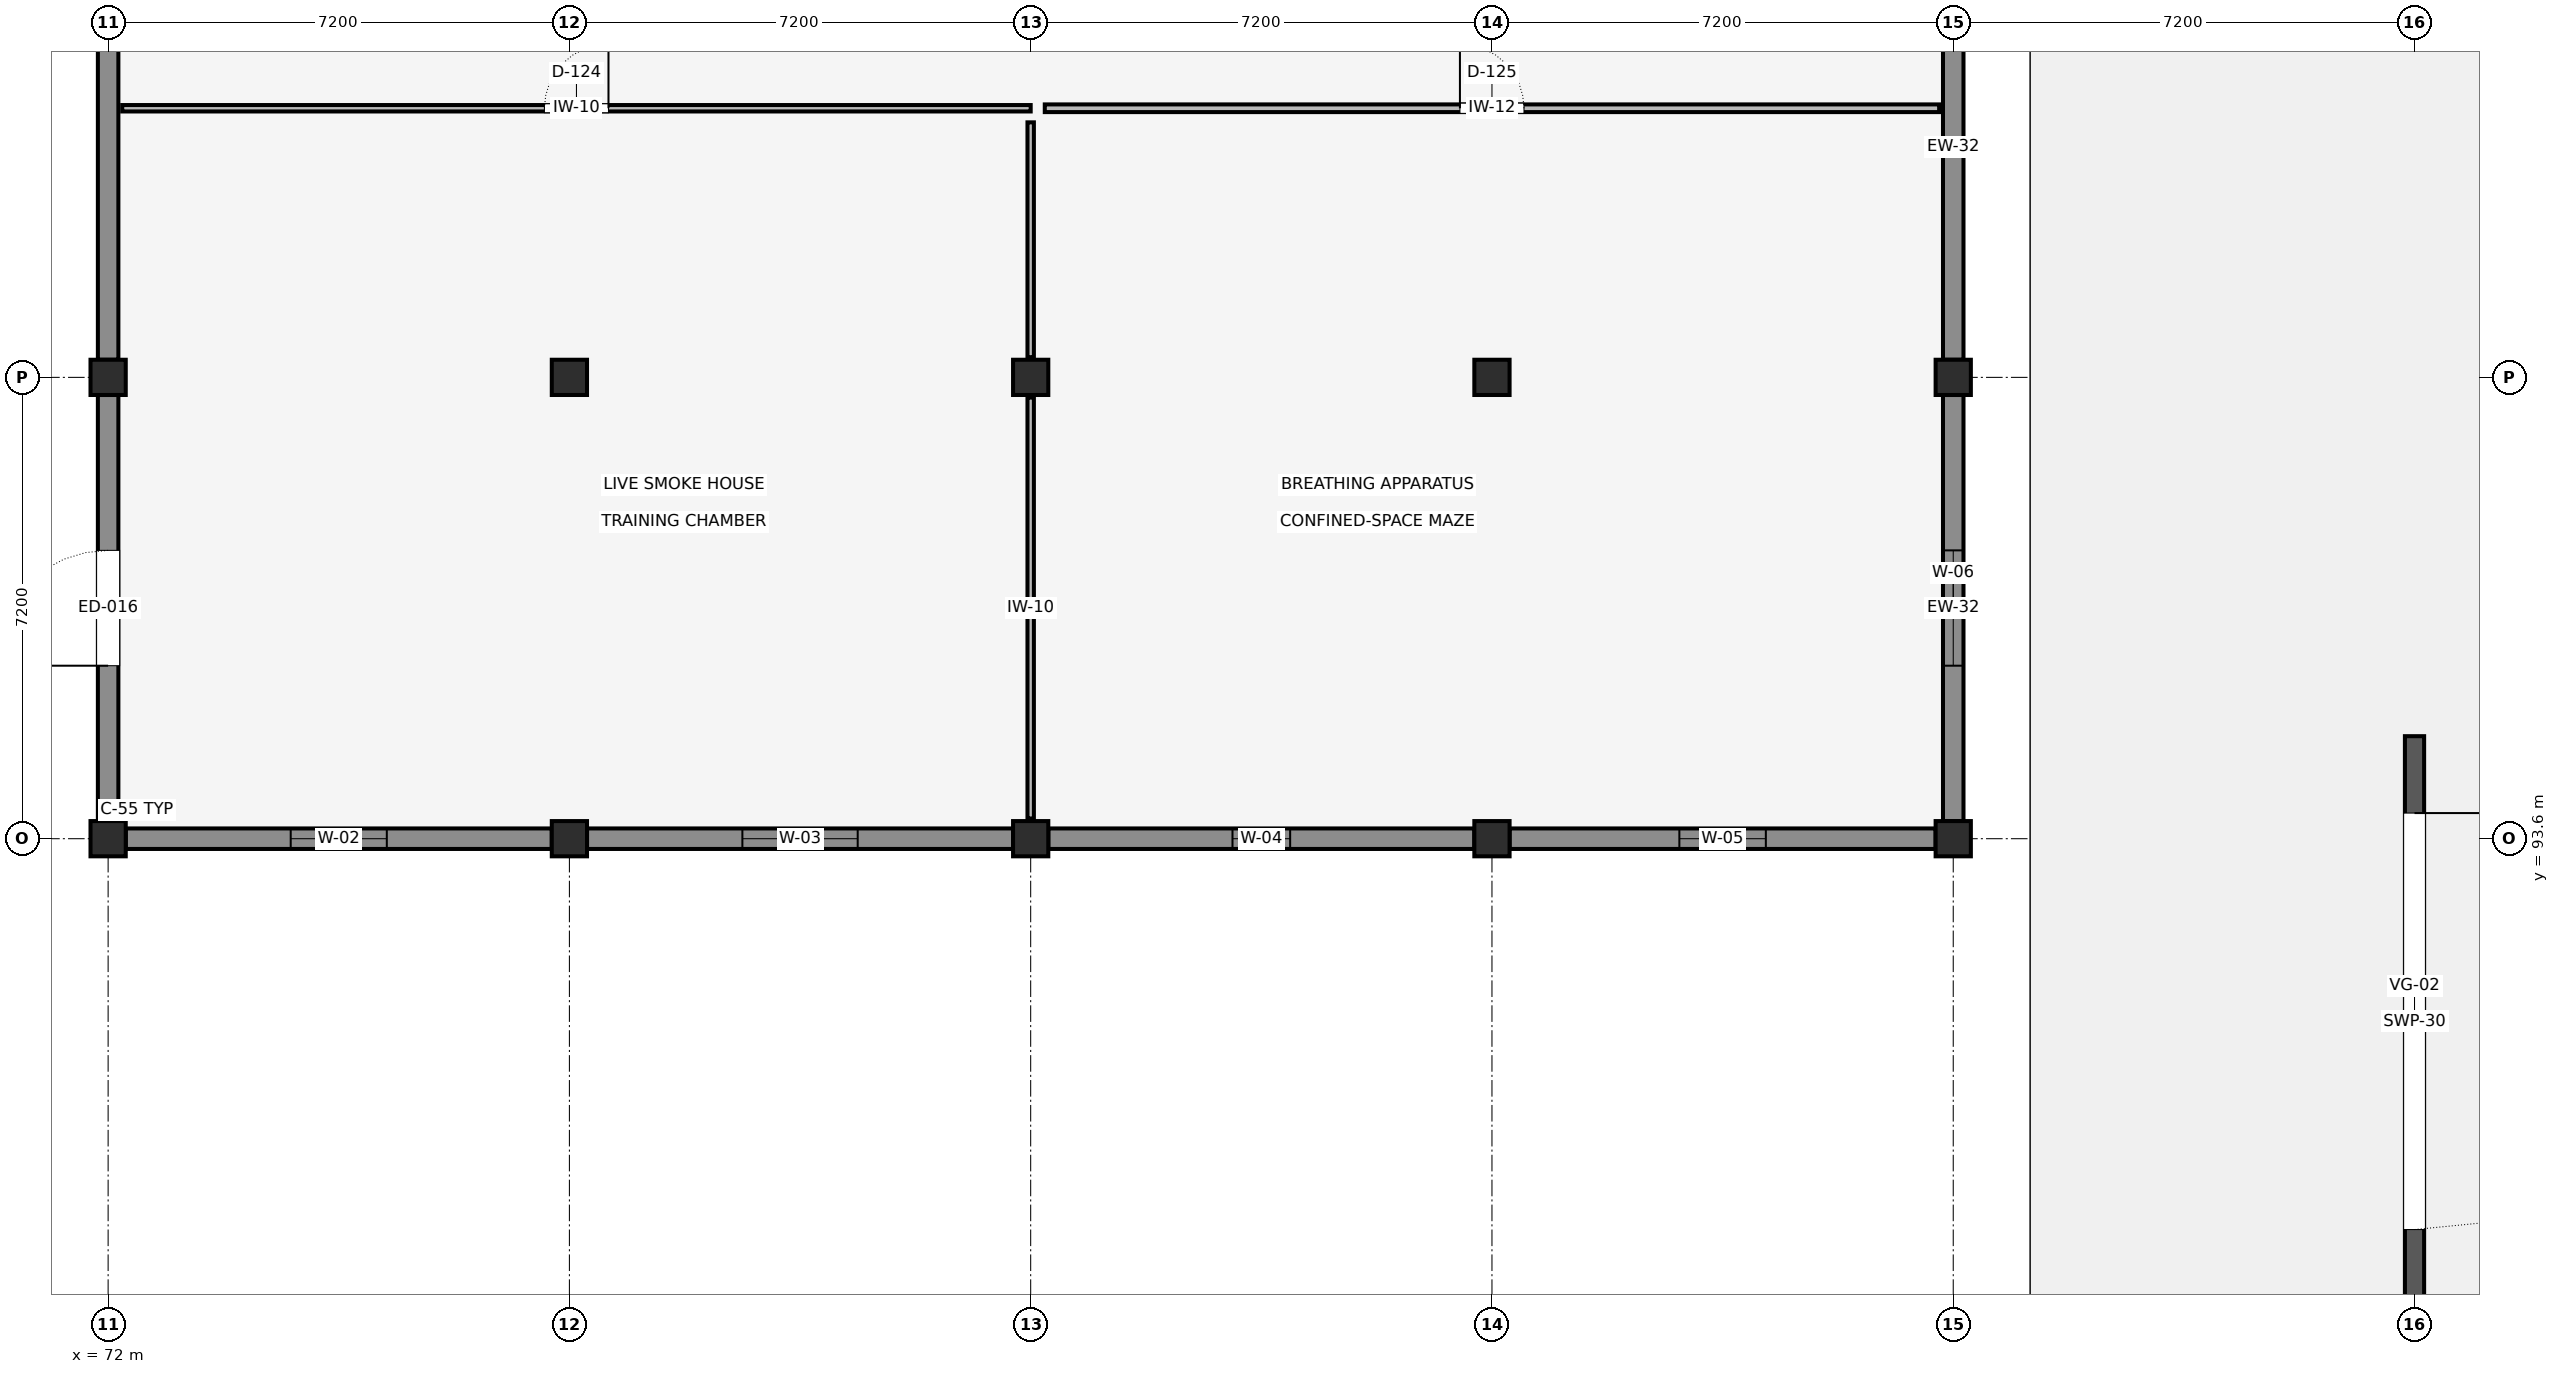
"""IFC4 building model, lengths in metres.
Left out: names, types, materials, properties, quantities, classifications, styles, units other than length and angle.
Written with IfcOpenShell. Run it as: python <this file> out.ifc"""

import sys

from ifc_helpers import new_model, si_unit, direction, frame, frame_2d, origin, origin_2d, place, context, subcontext, project, spatial, rectangle, extrude, element, fill, save


model = new_model("IFC4")
c1 = context("Model", 3, precision=1e-05, world=origin(), true_north=direction((0.0, 1.0)))
c2 = subcontext(c1, "Body", "Model", "MODEL_VIEW")
j1 = project(units=[si_unit("LENGTHUNIT", "METRE"), si_unit("PLANEANGLEUNIT", "RADIAN")], contexts=[c1])
p1 = place(None, origin())
s1 = spatial("IfcSite", under=j1, at=p1, CompositionType="ELEMENT")
p2 = place(p1, origin())
s2 = spatial("IfcBuilding", under=s1, at=p2, CompositionType="ELEMENT")
p3 = place(p2, origin())
s3 = spatial("IfcBuildingStorey", under=s2, at=p3, CompositionType="ELEMENT", Elevation=0.0)
for number, where, z_axis, x_axis in (
    (1, (72.0, 93.6, 0.0), (0.0, 0.0, 1.0), (1.0, 0.0, 0.0)),
    (2, (72.0, 100.8, 0.0), (0.0, 0.0, 1.0), (1.0, 0.0, 0.0)),
    (3, (79.2, 93.6, 0.0), (0.0, 0.0, 1.0), (1.0, 0.0, 0.0)),
    (4, (79.2, 100.8, 0.0), (0.0, 0.0, 1.0), (1.0, 0.0, 0.0)),
    (5, (86.4, 93.6, 0.0), (0.0, 0.0, 1.0), (1.0, 0.0, 0.0)),
    (6, (86.4, 100.8, 0.0), (0.0, 0.0, 1.0), (1.0, 0.0, 0.0)),
    (7, (93.6, 93.6, 0.0), (0.0, 0.0, 1.0), (1.0, 0.0, 0.0)),
    (8, (93.6, 100.8, 0.0), (0.0, 0.0, 1.0), (1.0, 0.0, 0.0)),
    (9, (100.8, 93.6, 0.0), (0.0, 0.0, 1.0), (1.0, 0.0, 0.0)),
    (10, (100.8, 100.8, 0.0), (0.0, 0.0, 1.0), (1.0, 0.0, 0.0)),
):
    element("IfcColumn", number, at=place(p3, frame(where, z_axis=z_axis, x_axis=x_axis)), inside=s3, PredefinedType="COLUMN", context=c2, shape_type="SweptSolid", body=[
        extrude(rectangle(XDim=0.55, YDim=0.55, at=origin_2d()), origin(), (0.0, 0.0, 1.0), 5.4),
    ])
p4 = place(p3, frame((100.8, 93.875, 0.0), z_axis=(0.0, 0.0, 1.0), x_axis=(0.0, 1.0, 0.0)))
e11 = element("IfcWall", 11, at=p4, inside=s3, PredefinedType="ELEMENTEDWALL", context=c2, shape_type="SweptSolid", body=[
    extrude(rectangle(XDim=6.65, YDim=0.32, at=frame_2d((3.325, 0.0))), origin(), (0.0, 0.0, 1.0), 4.55),
])
p5 = place(p4, frame((2.425, 0.0, 0.85)))
e12 = element("IfcOpeningElement", 12, at=p5, cuts=e11, PredefinedType="OPENING", context=c2, shape_type="SweptSolid", body=[
    extrude(rectangle(XDim=1.8, YDim=1.95, at=frame_2d((0.9, 0.975))), frame((0.0, 0.172, 0.0), z_axis=(0.0, -1.0, 0.0), x_axis=(1.0, 0.0, 0.0)), (0.0, 0.0, 1.0), 0.344),
])
p6 = place(p3, frame((100.8, 101.075, 0.0), z_axis=(0.0, 0.0, 1.0), x_axis=(0.0, 1.0, 0.0)))
e13 = element("IfcWall", 13, at=p6, inside=s3, PredefinedType="ELEMENTEDWALL", context=c2, shape_type="SweptSolid", body=[
    extrude(rectangle(XDim=6.65, YDim=0.32, at=frame_2d((3.325, 0.0))), origin(), (0.0, 0.0, 1.0), 4.52),
])
p7 = place(p3, frame((72.0, 107.725, 0.0), z_axis=(0.0, 0.0, 1.0), x_axis=(0.0, -1.0, 0.0)))
e14 = element("IfcWall", 14, at=p7, inside=s3, PredefinedType="ELEMENTEDWALL", context=c2, shape_type="SweptSolid", body=[
    extrude(rectangle(XDim=6.65, YDim=0.32, at=frame_2d((3.325, 0.0))), origin(), (0.0, 0.0, 1.0), 4.5),
])
p8 = place(p3, frame((72.0, 100.525, 0.0), z_axis=(0.0, 0.0, 1.0), x_axis=(0.0, -1.0, 0.0)))
e15 = element("IfcWall", 15, at=p8, inside=s3, PredefinedType="ELEMENTEDWALL", context=c2, shape_type="SweptSolid", body=[
    extrude(rectangle(XDim=6.65, YDim=0.32, at=frame_2d((3.325, 0.0))), origin(), (0.0, 0.0, 1.0), 4.55),
])
p9 = place(p8, frame((2.425, 0.0, 0.0)))
e16 = element("IfcOpeningElement", 16, at=p9, cuts=e15, PredefinedType="OPENING", context=c2, shape_type="SweptSolid", body=[
    extrude(rectangle(XDim=1.8, YDim=2.2, at=frame_2d((0.9, 1.1))), frame((0.0, 0.172, 0.0), z_axis=(0.0, -1.0, 0.0), x_axis=(1.0, 0.0, 0.0)), (0.0, 0.0, 1.0), 0.344),
])
p10 = place(p3, frame((72.275, 93.6, 0.0), z_axis=(0.0, 0.0, 1.0), x_axis=(1.0, 0.0, 0.0)))
e17 = element("IfcWall", 17, at=p10, inside=s3, PredefinedType="ELEMENTEDWALL", context=c2, shape_type="SweptSolid", body=[
    extrude(rectangle(XDim=6.65, YDim=0.32, at=frame_2d((3.325, 0.0))), origin(), (0.0, 0.0, 1.0), 4.45),
])
p11 = place(p10, frame((2.575, 0.0, 0.85)))
e18 = element("IfcOpeningElement", 18, at=p11, cuts=e17, PredefinedType="OPENING", context=c2, shape_type="SweptSolid", body=[
    extrude(rectangle(XDim=1.5, YDim=2.2, at=frame_2d((0.75, 1.1))), frame((0.0, 0.172, 0.0), z_axis=(0.0, -1.0, 0.0), x_axis=(1.0, 0.0, 0.0)), (0.0, 0.0, 1.0), 0.344),
])
p12 = place(p3, frame((79.475, 93.6, 0.0), z_axis=(0.0, 0.0, 1.0), x_axis=(1.0, 0.0, 0.0)))
e19 = element("IfcWall", 19, at=p12, inside=s3, PredefinedType="ELEMENTEDWALL", context=c2, shape_type="SweptSolid", body=[
    extrude(rectangle(XDim=6.65, YDim=0.32, at=frame_2d((3.325, 0.0))), origin(), (0.0, 0.0, 1.0), 4.4),
])
p13 = place(p12, frame((2.425, 0.0, 0.85)))
e20 = element("IfcOpeningElement", 20, at=p13, cuts=e19, PredefinedType="OPENING", context=c2, shape_type="SweptSolid", body=[
    extrude(rectangle(XDim=1.8, YDim=2.2, at=frame_2d((0.9, 1.1))), frame((0.0, 0.172, 0.0), z_axis=(0.0, -1.0, 0.0), x_axis=(1.0, 0.0, 0.0)), (0.0, 0.0, 1.0), 0.344),
])
p14 = place(p3, frame((86.675, 93.6, 0.0), z_axis=(0.0, 0.0, 1.0), x_axis=(1.0, 0.0, 0.0)))
e21 = element("IfcWall", 21, at=p14, inside=s3, PredefinedType="ELEMENTEDWALL", context=c2, shape_type="SweptSolid", body=[
    extrude(rectangle(XDim=6.65, YDim=0.32, at=frame_2d((3.325, 0.0))), origin(), (0.0, 0.0, 1.0), 4.45),
])
p15 = place(p14, frame((2.875, 0.0, 0.85)))
e22 = element("IfcOpeningElement", 22, at=p15, cuts=e21, PredefinedType="OPENING", context=c2, shape_type="SweptSolid", body=[
    extrude(rectangle(XDim=0.9, YDim=2.0, at=frame_2d((0.45, 1.0))), frame((0.0, 0.172, 0.0), z_axis=(0.0, -1.0, 0.0), x_axis=(1.0, 0.0, 0.0)), (0.0, 0.0, 1.0), 0.344),
])
p16 = place(p3, frame((93.875, 93.6, 0.0), z_axis=(0.0, 0.0, 1.0), x_axis=(1.0, 0.0, 0.0)))
e23 = element("IfcWall", 23, at=p16, inside=s3, PredefinedType="ELEMENTEDWALL", context=c2, shape_type="SweptSolid", body=[
    extrude(rectangle(XDim=6.65, YDim=0.32, at=frame_2d((3.325, 0.0))), origin(), (0.0, 0.0, 1.0), 4.4),
])
p17 = place(p16, frame((2.65, 0.0, 0.85)))
e24 = element("IfcOpeningElement", 24, at=p17, cuts=e23, PredefinedType="OPENING", context=c2, shape_type="SweptSolid", body=[
    extrude(rectangle(XDim=1.35, YDim=2.0, at=frame_2d((0.675, 1.0))), frame((0.0, 0.172, 0.0), z_axis=(0.0, -1.0, 0.0), x_axis=(1.0, 0.0, 0.0)), (0.0, 0.0, 1.0), 0.344),
])
p18 = place(p3, frame((108.0, 86.3, 0.0), z_axis=(0.0, 0.0, 1.0), x_axis=(0.0, 1.0, 0.0)))
e25 = element("IfcWall", 25, at=p18, inside=s3, PredefinedType="STANDARD", context=c2, shape_type="SweptSolid", body=[
    extrude(rectangle(XDim=8.9, YDim=0.3, at=frame_2d((4.45, 0.0))), origin(), (0.0, 0.0, 1.0), 3.55),
])
p19 = place(p18, frame((1.2, 0.0, 0.0)))
e26 = element("IfcOpeningElement", 26, at=p19, cuts=e25, PredefinedType="OPENING", context=c2, shape_type="SweptSolid", body=[
    extrude(rectangle(XDim=6.5, YDim=2.15, at=frame_2d((3.25, 1.075))), frame((0.0, 0.162, 0.0), z_axis=(0.0, -1.0, 0.0), x_axis=(1.0, 0.0, 0.0)), (0.0, 0.0, 1.0), 0.324),
])
p20 = place(p3, frame((72.22, 105.0, 0.0), z_axis=(0.0, 0.0, 1.0), x_axis=(1.0, 0.0, 0.0)))
e27 = element("IfcWall", 27, at=p20, inside=s3, PredefinedType="PARTITIONING", context=c2, shape_type="SweptSolid", body=[
    extrude(rectangle(XDim=14.18, YDim=0.1, at=frame_2d((7.09, 0.0))), origin(), (0.0, 0.0, 1.0), 4.518),
])
p21 = place(p20, frame((6.59, 0.0, 0.0)))
e28 = element("IfcOpeningElement", 28, at=p21, cuts=e27, PredefinedType="OPENING", context=c2, shape_type="SweptSolid", body=[
    extrude(rectangle(XDim=1.0, YDim=2.15, at=frame_2d((0.5, 1.075))), frame((0.0, 0.062, 0.0), z_axis=(0.0, -1.0, 0.0), x_axis=(1.0, 0.0, 0.0)), (0.0, 0.0, 1.0), 0.124),
])
p22 = place(p3, frame((86.4, 93.915, 0.0), z_axis=(0.0, 0.0, 1.0), x_axis=(0.0, 1.0, 0.0)))
e29 = element("IfcWall", 29, at=p22, inside=s3, PredefinedType="PARTITIONING", context=c2, shape_type="SweptSolid", body=[
    extrude(rectangle(XDim=6.57, YDim=0.1, at=frame_2d((3.285, 0.0))), origin(), (0.0, 0.0, 1.0), 4.548),
])
p23 = place(p3, frame((86.4, 101.115, 0.0), z_axis=(0.0, 0.0, 1.0), x_axis=(0.0, 1.0, 0.0)))
e30 = element("IfcWall", 30, at=p23, inside=s3, PredefinedType="PARTITIONING", context=c2, shape_type="SweptSolid", body=[
    extrude(rectangle(XDim=3.665, YDim=0.1, at=frame_2d((1.833, 0.0))), origin(), (0.0, 0.0, 1.0), 4.518),
])
p24 = place(p3, frame((86.62, 105.0, 0.0), z_axis=(0.0, 0.0, 1.0), x_axis=(1.0, 0.0, 0.0)))
e31 = element("IfcWall", 31, at=p24, inside=s3, PredefinedType="PARTITIONING", context=c2, shape_type="SweptSolid", body=[
    extrude(rectangle(XDim=13.96, YDim=0.12, at=frame_2d((6.98, 0.0))), origin(), (0.0, 0.0, 1.0), 4.568),
])
p25 = place(p24, frame((6.48, 0.0, 0.0)))
e32 = element("IfcOpeningElement", 32, at=p25, cuts=e31, PredefinedType="OPENING", context=c2, shape_type="SweptSolid", body=[
    extrude(rectangle(XDim=1.0, YDim=2.15, at=frame_2d((0.5, 1.075))), frame((0.0, 0.072, 0.0), z_axis=(0.0, -1.0, 0.0), x_axis=(1.0, 0.0, 0.0)), (0.0, 0.0, 1.0), 0.144),
])
p26 = place(p5, origin())
e33 = element("IfcWindow", 33, at=p26, inside=s3, PartitioningType="SINGLE_PANEL", PredefinedType="WINDOW", context=c2, shape_type="SweptSolid", body=[
    extrude(rectangle(XDim=1.8, YDim=1.95, at=frame_2d((0.9, 0.975))), frame((0.0, 0.03, 0.0), z_axis=(0.0, -1.0, 0.0), x_axis=(1.0, 0.0, 0.0)), (0.0, 0.0, 1.0), 0.06),
])
fill(e12, e33)
p27 = place(p9, frame((1.8, 0.0, 0.0), z_axis=(0.0, 0.0, 1.0), x_axis=(-1.0, 0.0, 0.0)))
e34 = element("IfcDoor", 34, at=p27, inside=s3, OperationType="DOUBLE_SWING_LEFT", PredefinedType="DOOR", context=c2, shape_type="SweptSolid", body=[
    extrude(rectangle(XDim=1.8, YDim=2.2, at=frame_2d((0.9, 1.1))), frame((0.0, 0.025, 0.0), z_axis=(0.0, -1.0, 0.0), x_axis=(1.0, 0.0, 0.0)), (0.0, 0.0, 1.0), 0.05),
])
fill(e16, e34)
p28 = place(p11, origin())
e35 = element("IfcWindow", 35, at=p28, inside=s3, PartitioningType="SINGLE_PANEL", PredefinedType="WINDOW", context=c2, shape_type="SweptSolid", body=[
    extrude(rectangle(XDim=1.5, YDim=2.2, at=frame_2d((0.75, 1.1))), frame((0.0, 0.03, 0.0), z_axis=(0.0, -1.0, 0.0), x_axis=(1.0, 0.0, 0.0)), (0.0, 0.0, 1.0), 0.06),
])
fill(e18, e35)
p29 = place(p13, origin())
e36 = element("IfcWindow", 36, at=p29, inside=s3, PartitioningType="SINGLE_PANEL", PredefinedType="WINDOW", context=c2, shape_type="SweptSolid", body=[
    extrude(rectangle(XDim=1.8, YDim=2.2, at=frame_2d((0.9, 1.1))), frame((0.0, 0.03, 0.0), z_axis=(0.0, -1.0, 0.0), x_axis=(1.0, 0.0, 0.0)), (0.0, 0.0, 1.0), 0.06),
])
fill(e20, e36)
p30 = place(p15, origin())
e37 = element("IfcWindow", 37, at=p30, inside=s3, PartitioningType="SINGLE_PANEL", PredefinedType="WINDOW", context=c2, shape_type="SweptSolid", body=[
    extrude(rectangle(XDim=0.9, YDim=2.0, at=frame_2d((0.45, 1.0))), frame((0.0, 0.03, 0.0), z_axis=(0.0, -1.0, 0.0), x_axis=(1.0, 0.0, 0.0)), (0.0, 0.0, 1.0), 0.06),
])
fill(e22, e37)
p31 = place(p17, origin())
e38 = element("IfcWindow", 38, at=p31, inside=s3, PartitioningType="SINGLE_PANEL", PredefinedType="WINDOW", context=c2, shape_type="SweptSolid", body=[
    extrude(rectangle(XDim=1.35, YDim=2.0, at=frame_2d((0.675, 1.0))), frame((0.0, 0.03, 0.0), z_axis=(0.0, -1.0, 0.0), x_axis=(1.0, 0.0, 0.0)), (0.0, 0.0, 1.0), 0.06),
])
fill(e24, e38)
p32 = place(p19, frame((6.5, 0.0, 0.0), z_axis=(0.0, 0.0, 1.0), x_axis=(-1.0, 0.0, 0.0)))
e39 = element("IfcDoor", 39, at=p32, inside=s3, OperationType="DOUBLE_SWING_LEFT", PredefinedType="DOOR", context=c2, shape_type="SweptSolid", body=[
    extrude(rectangle(XDim=6.5, YDim=2.15, at=frame_2d((3.25, 1.075))), frame((0.0, 0.025, 0.0), z_axis=(0.0, -1.0, 0.0), x_axis=(1.0, 0.0, 0.0)), (0.0, 0.0, 1.0), 0.05),
])
fill(e26, e39)
p33 = place(p21, origin())
e40 = element("IfcDoor", 40, at=p33, inside=s3, OperationType="SINGLE_SWING_RIGHT", PredefinedType="DOOR", context=c2, shape_type="SweptSolid", body=[
    extrude(rectangle(XDim=1.0, YDim=2.15, at=frame_2d((0.5, 1.075))), frame((0.0, 0.025, 0.0), z_axis=(0.0, -1.0, 0.0), x_axis=(1.0, 0.0, 0.0)), (0.0, 0.0, 1.0), 0.05),
])
fill(e28, e40)
p34 = place(p25, origin())
e41 = element("IfcDoor", 41, at=p34, inside=s3, OperationType="SINGLE_SWING_LEFT", PredefinedType="DOOR", context=c2, shape_type="SweptSolid", body=[
    extrude(rectangle(XDim=1.0, YDim=2.15, at=frame_2d((0.5, 1.075))), frame((0.0, 0.025, 0.0), z_axis=(0.0, -1.0, 0.0), x_axis=(1.0, 0.0, 0.0)), (0.0, 0.0, 1.0), 0.05),
])
fill(e32, e41)
save(model, sys.argv[1])
